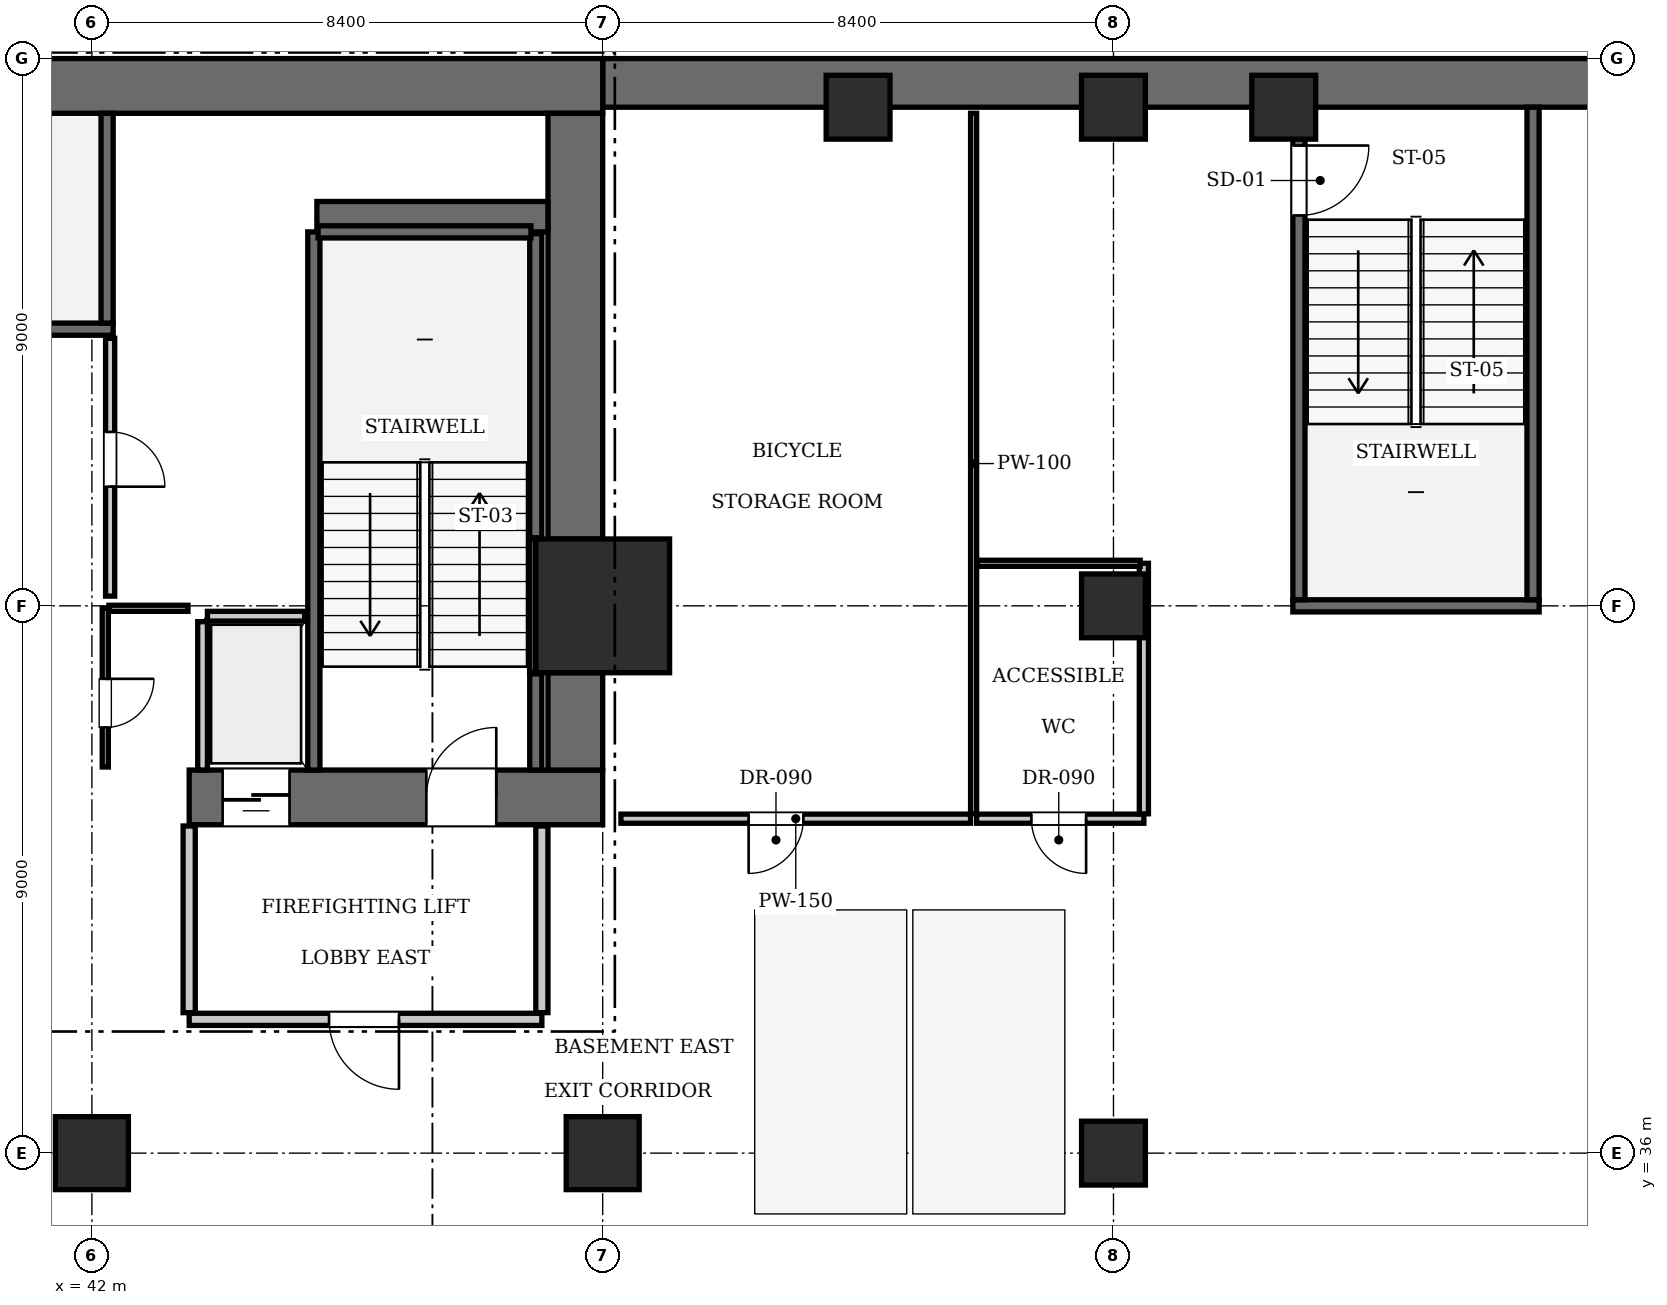
"""IFC4 building model, lengths in metres.
Left out: names, types, materials, properties, quantities, classifications, styles, units other than length and angle.
Written with IfcOpenShell. Run it as: python <this file> out.ifc"""

import sys

from ifc_helpers import new_model, si_unit, direction, frame, frame_2d, origin, origin_2d, place, context, subcontext, project, spatial, rectangle, extrude, element, fill, save


model = new_model("IFC4")
c1 = context("Model", 3, precision=1e-05, world=origin(), true_north=direction((0.0, 1.0)))
c2 = subcontext(c1, "Body", "Model", "MODEL_VIEW")
j1 = project(units=[si_unit("LENGTHUNIT", "METRE"), si_unit("PLANEANGLEUNIT", "RADIAN")], contexts=[c1])
p1 = place(None, origin())
s1 = spatial("IfcSite", under=j1, at=p1, CompositionType="ELEMENT")
p2 = place(p1, origin())
s2 = spatial("IfcBuilding", under=s1, at=p2, CompositionType="ELEMENT")
p3 = place(p2, frame((0.0, 0.0, -9.8)))
s3 = spatial("IfcBuildingStorey", under=s2, at=p3, CompositionType="ELEMENT", Elevation=-9.8)
p4 = place(p3, frame((50.4, 53.6, 0.0), z_axis=(0.0, 0.0, 1.0), x_axis=(1.0, 0.0, 0.0)))
e1 = element("IfcWall", 1, at=p4, inside=s3, PredefinedType="USERDEFINED", context=c2, shape_type="SweptSolid", body=[
    extrude(rectangle(XDim=25.2, YDim=0.8, at=frame_2d((12.6, 0.0))), origin(), (0.0, 0.0, 1.0), 4.55),
])
p5 = place(p3, frame((50.4, 45.0, -0.4), z_axis=(0.0, 0.0, 1.0), x_axis=(1.0, 0.0, 0.0)))
e2 = element("IfcColumn", 2, at=p5, inside=s3, PredefinedType="COLUMN", context=c2, shape_type="SweptSolid", body=[
    extrude(rectangle(XDim=2.2, YDim=2.2, at=origin_2d()), origin(), (0.0, 0.0, 1.0), 4.95),
])
p6 = place(p3, frame((25.2, 53.55, 0.0), z_axis=(0.0, 0.0, 1.0), x_axis=(1.0, 0.0, 0.0)))
e3 = element("IfcWall", 3, at=p6, inside=s3, PredefinedType="SHEAR", context=c2, shape_type="SweptSolid", body=[
    extrude(rectangle(XDim=25.2, YDim=0.9, at=frame_2d((12.6, 0.0))), origin(), (0.0, 0.0, 1.0), 4.55),
])
p7 = place(p3, frame((43.6, 41.85, 0.0), z_axis=(0.0, 0.0, 1.0), x_axis=(1.0, 0.0, 0.0)))
e4 = element("IfcWall", 4, at=p7, inside=s3, PredefinedType="SHEAR", context=c2, shape_type="SweptSolid", body=[
    extrude(rectangle(XDim=6.8, YDim=0.9, at=frame_2d((3.4, 0.0))), origin(), (0.0, 0.0, 1.0), 4.55),
])
p8 = place(p7, frame((3.9, 0.0, 0.0)))
e5 = element("IfcOpeningElement", 5, at=p8, cuts=e4, PredefinedType="OPENING", context=c2, shape_type="SweptSolid", body=[
    extrude(rectangle(XDim=1.15, YDim=2.15, at=frame_2d((0.575, 1.075))), frame((0.0, 0.46, 0.0), z_axis=(0.0, -1.0, 0.0), x_axis=(1.0, 0.0, 0.0)), (0.0, 0.0, 1.0), 0.92),
])
p9 = place(p7, frame((0.55, 0.0, 0.0)))
e6 = element("IfcOpeningElement", 6, at=p9, cuts=e4, PredefinedType="OPENING", context=c2, shape_type="SweptSolid", body=[
    extrude(rectangle(XDim=1.1, YDim=2.2, at=frame_2d((0.55, 1.1))), frame((0.0, 0.46, 0.0), z_axis=(0.0, -1.0, 0.0), x_axis=(1.0, 0.0, 0.0)), (0.0, 0.0, 1.0), 0.92),
])
p10 = place(p3, frame((49.95, 42.3, 0.0), z_axis=(0.0, 0.0, 1.0), x_axis=(0.0, 1.0, 0.0)))
e7 = element("IfcWall", 7, at=p10, inside=s3, PredefinedType="SHEAR", context=c2, shape_type="SweptSolid", body=[
    extrude(rectangle(XDim=1.6, YDim=0.9, at=frame_2d((0.8, 0.0))), origin(), (0.0, 0.0, 1.0), 4.55),
])
p11 = place(p3, frame((49.95, 46.1, 0.0), z_axis=(0.0, 0.0, 1.0), x_axis=(0.0, 1.0, 0.0)))
e8 = element("IfcWall", 8, at=p11, inside=s3, PredefinedType="SHEAR", context=c2, shape_type="SweptSolid", body=[
    extrude(rectangle(XDim=7.0, YDim=0.9, at=frame_2d((3.5, 0.0))), origin(), (0.0, 0.0, 1.0), 4.55),
])
p12 = place(p3, frame((45.7, 51.4, 0.0), z_axis=(0.0, 0.0, 1.0), x_axis=(1.0, 0.0, 0.0)))
e9 = element("IfcWall", 9, at=p12, inside=s3, PredefinedType="SHEAR", context=c2, shape_type="SweptSolid", body=[
    extrude(rectangle(XDim=3.8, YDim=0.5, at=frame_2d((1.9, 0.0))), origin(), (0.0, 0.0, 1.0), 4.55),
])
for number, where, z_axis, x_axis in (
    (10, (42.0, 36.0, -0.4), (0.0, 0.0, 1.0), (1.0, 0.0, 0.0)),
    (11, (50.4, 36.0, -0.4), (0.0, 0.0, 1.0), (1.0, 0.0, 0.0)),
):
    element("IfcColumn", number, at=place(p3, frame(where, z_axis=z_axis, x_axis=x_axis)), inside=s3, PredefinedType="COLUMN", context=c2, shape_type="SweptSolid", body=[
        extrude(rectangle(XDim=1.2, YDim=1.2, at=origin_2d()), origin(), (0.0, 0.0, 1.0), 4.95),
    ])
for number, where, z_axis, x_axis in (
    (12, (58.8, 36.0, -0.4), (0.0, 0.0, 1.0), (1.0, 0.0, 0.0)),
    (13, (58.8, 45.0, -0.4), (0.0, 0.0, 1.0), (1.0, 0.0, 0.0)),
    (14, (58.8, 53.2, -0.4), (0.0, 0.0, 1.0), (1.0, 0.0, 0.0)),
    (15, (54.6, 53.2, -0.4), (0.0, 0.0, 1.0), (1.0, 0.0, 0.0)),
    (16, (61.6, 53.2, -0.4), (0.0, 0.0, 1.0), (1.0, 0.0, 0.0)),
):
    element("IfcColumn", number, at=place(p3, frame(where, z_axis=z_axis, x_axis=x_axis)), inside=s3, PredefinedType="COLUMN", context=c2, shape_type="SweptSolid", body=[
        extrude(rectangle(XDim=1.05, YDim=1.05, at=origin_2d()), origin(), (0.0, 0.0, 1.0), 4.95),
    ])
p13 = place(p3, frame((33.25, 49.55, 0.0), z_axis=(0.0, 0.0, 1.0), x_axis=(1.0, 0.0, 0.0)))
e17 = element("IfcWall", 17, at=p13, inside=s3, PredefinedType="SOLIDWALL", context=c2, shape_type="SweptSolid", body=[
    extrude(rectangle(XDim=9.1, YDim=0.2, at=frame_2d((4.55, 0.0))), origin(), (0.0, 0.0, 1.0), 4.2),
])
p14 = place(p3, frame((42.25, 49.65, 0.0), z_axis=(0.0, 0.0, 1.0), x_axis=(0.0, 1.0, 0.0)))
e18 = element("IfcWall", 18, at=p14, inside=s3, PredefinedType="SOLIDWALL", context=c2, shape_type="SweptSolid", body=[
    extrude(rectangle(XDim=3.45, YDim=0.2, at=frame_2d((1.725, 0.0))), origin(), (0.0, 0.0, 1.0), 4.2),
])
p15 = place(p3, frame((45.65, 42.3, 0.0), z_axis=(0.0, 0.0, 1.0), x_axis=(0.0, 1.0, 0.0)))
e19 = element("IfcWall", 19, at=p15, inside=s3, PredefinedType="SOLIDWALL", context=c2, shape_type="SweptSolid", body=[
    extrude(rectangle(XDim=8.85, YDim=0.2, at=frame_2d((4.425, 0.0))), origin(), (0.0, 0.0, 1.0), 4.2),
])
p16 = place(p3, frame((49.3, 42.3, 0.0), z_axis=(0.0, 0.0, 1.0), x_axis=(0.0, 1.0, 0.0)))
e20 = element("IfcWall", 20, at=p16, inside=s3, PredefinedType="SOLIDWALL", context=c2, shape_type="SweptSolid", body=[
    extrude(rectangle(XDim=1.58, YDim=0.2, at=frame_2d((0.79, 0.0))), origin(), (0.0, 0.0, 1.0), 4.2),
])
p17 = place(p3, frame((49.3, 46.12, 0.0), z_axis=(0.0, 0.0, 1.0), x_axis=(0.0, 1.0, 0.0)))
e21 = element("IfcWall", 21, at=p17, inside=s3, PredefinedType="SOLIDWALL", context=c2, shape_type="SweptSolid", body=[
    extrude(rectangle(XDim=5.0, YDim=0.2, at=frame_2d((2.5, 0.0))), origin(), (0.0, 0.0, 1.0), 4.2),
])
p18 = place(p3, frame((45.72, 51.15, 0.0), z_axis=(0.0, 0.0, 1.0), x_axis=(1.0, 0.0, 0.0)))
e22 = element("IfcWall", 22, at=p18, inside=s3, PredefinedType="SOLIDWALL", context=c2, shape_type="SweptSolid", body=[
    extrude(rectangle(XDim=3.5, YDim=0.2, at=frame_2d((1.75, 0.0))), origin(), (0.0, 0.0, 1.0), 4.2),
])
p19 = place(p3, frame((49.248, 43.9, 0.0), z_axis=(0.0, 0.0, 1.0), x_axis=(0.0, 1.0, 0.0)))
e23 = element("IfcWall", 23, at=p19, inside=s3, PredefinedType="SOLIDWALL", context=c2, shape_type="SweptSolid", body=[
    extrude(rectangle(XDim=2.2, YDim=0.1, at=frame_2d((1.1, 0.0))), origin(), (0.0, 0.0, 1.0), 4.2),
])
p20 = place(p3, frame((61.75, 45.0, 0.0), z_axis=(0.0, 0.0, 1.0), x_axis=(1.0, 0.0, 0.0)))
e24 = element("IfcWall", 24, at=p20, inside=s3, PredefinedType="SOLIDWALL", context=c2, shape_type="SweptSolid", body=[
    extrude(rectangle(XDim=4.05, YDim=0.2, at=frame_2d((2.025, 0.0))), origin(), (0.0, 0.0, 1.0), 3.565),
])
p21 = place(p3, frame((61.85, 45.1, 0.0), z_axis=(0.0, 0.0, 1.0), x_axis=(0.0, 1.0, 0.0)))
e25 = element("IfcWall", 25, at=p21, inside=s3, PredefinedType="SOLIDWALL", context=c2, shape_type="SweptSolid", body=[
    extrude(rectangle(XDim=8.1, YDim=0.2, at=frame_2d((4.05, 0.0))), origin(), (0.0, 0.0, 1.0), 4.2),
])
p22 = place(p21, frame((6.32, 0.0, 0.0)))
e26 = element("IfcOpeningElement", 26, at=p22, cuts=e25, PredefinedType="OPENING", context=c2, shape_type="SweptSolid", body=[
    extrude(rectangle(XDim=1.15, YDim=2.15, at=frame_2d((0.575, 1.075))), frame((0.0, 0.11, 0.0), z_axis=(0.0, -1.0, 0.0), x_axis=(1.0, 0.0, 0.0)), (0.0, 0.0, 1.0), 0.22),
])
p23 = place(p3, frame((65.7, 45.1, 0.0), z_axis=(0.0, 0.0, 1.0), x_axis=(0.0, 1.0, 0.0)))
e27 = element("IfcWall", 27, at=p23, inside=s3, PredefinedType="SOLIDWALL", context=c2, shape_type="SweptSolid", body=[
    extrude(rectangle(XDim=8.1, YDim=0.2, at=frame_2d((4.05, 0.0))), origin(), (0.0, 0.0, 1.0), 4.2),
])
p24 = place(p3, frame((43.9, 44.83, 0.0), z_axis=(0.0, 0.0, 1.0), x_axis=(1.0, 0.0, 0.0)))
e28 = element("IfcWall", 28, at=p24, inside=s3, PredefinedType="SOLIDWALL", context=c2, shape_type="SweptSolid", body=[
    extrude(rectangle(XDim=1.6, YDim=0.16, at=frame_2d((0.8, 0.0))), origin(), (0.0, 0.0, 1.0), 4.2),
])
p25 = place(p3, frame((43.82, 42.3, 0.0), z_axis=(0.0, 0.0, 1.0), x_axis=(0.0, 1.0, 0.0)))
e29 = element("IfcWall", 29, at=p25, inside=s3, PredefinedType="SOLIDWALL", context=c2, shape_type="SweptSolid", body=[
    extrude(rectangle(XDim=2.44, YDim=0.16, at=frame_2d((1.22, 0.0))), origin(), (0.0, 0.0, 1.0), 4.2),
])
p26 = place(p3, frame((43.6, 38.2, 0.0), z_axis=(0.0, 0.0, 1.0), x_axis=(1.0, 0.0, 0.0)))
e30 = element("IfcWall", 30, at=p26, inside=s3, PredefinedType="PARTITIONING", context=c2, shape_type="SweptSolid", body=[
    extrude(rectangle(XDim=5.8, YDim=0.2, at=frame_2d((2.9, 0.0))), origin(), (0.0, 0.0, 1.0), 4.2),
])
p27 = place(p26, frame((2.3, 0.0, 0.0)))
e31 = element("IfcOpeningElement", 31, at=p27, cuts=e30, PredefinedType="OPENING", context=c2, shape_type="SweptSolid", body=[
    extrude(rectangle(XDim=1.15, YDim=2.15, at=frame_2d((0.575, 1.075))), frame((0.0, 0.11, 0.0), z_axis=(0.0, -1.0, 0.0), x_axis=(1.0, 0.0, 0.0)), (0.0, 0.0, 1.0), 0.22),
])
for number, where, z_axis, x_axis in (
    (32, (43.6, 38.31, 0.0), (0.0, 0.0, 1.0), (0.0, 1.0, 0.0)),
    (33, (49.4, 38.31, 0.0), (0.0, 0.0, 1.0), (0.0, 1.0, 0.0)),
):
    element("IfcWall", number, at=place(p3, frame(where, z_axis=z_axis, x_axis=x_axis)), inside=s3, PredefinedType="PARTITIONING", context=c2, shape_type="SweptSolid", body=[
        extrude(rectangle(XDim=3.07, YDim=0.2, at=frame_2d((1.535, 0.0))), origin(), (0.0, 0.0, 1.0), 4.2),
    ])
p28 = place(p3, frame((42.22, 42.35, 0.0), z_axis=(0.0, 0.0, 1.0), x_axis=(0.0, 1.0, 0.0)))
e34 = element("IfcWall", 34, at=p28, inside=s3, PredefinedType="PARTITIONING", context=c2, shape_type="SweptSolid", body=[
    extrude(rectangle(XDim=2.61, YDim=0.1, at=frame_2d((1.305, 0.0))), origin(), (0.0, 0.0, 1.0), 4.2),
])
p29 = place(p28, frame((0.65, 0.0, 0.0)))
e35 = element("IfcOpeningElement", 35, at=p29, cuts=e34, PredefinedType="OPENING", context=c2, shape_type="SweptSolid", body=[
    extrude(rectangle(XDim=0.8, YDim=2.05, at=frame_2d((0.4, 1.025))), frame((0.0, 0.06, 0.0), z_axis=(0.0, -1.0, 0.0), x_axis=(1.0, 0.0, 0.0)), (0.0, 0.0, 1.0), 0.12),
])
p30 = place(p3, frame((42.28, 44.96, 0.0), z_axis=(0.0, 0.0, 1.0), x_axis=(1.0, 0.0, 0.0)))
e36 = element("IfcWall", 36, at=p30, inside=s3, PredefinedType="PARTITIONING", context=c2, shape_type="SweptSolid", body=[
    extrude(rectangle(XDim=1.3, YDim=0.1, at=frame_2d((0.65, 0.0))), origin(), (0.0, 0.0, 1.0), 4.2),
])
p31 = place(p3, frame((42.3, 45.16, 0.0), z_axis=(0.0, 0.0, 1.0), x_axis=(0.0, 1.0, 0.0)))
e37 = element("IfcWall", 37, at=p31, inside=s3, PredefinedType="PARTITIONING", context=c2, shape_type="SweptSolid", body=[
    extrude(rectangle(XDim=4.24, YDim=0.15, at=frame_2d((2.12, 0.0))), origin(), (0.0, 0.0, 1.0), 4.2),
])
p32 = place(p31, frame((1.8, 0.0, 0.0)))
e38 = element("IfcOpeningElement", 38, at=p32, cuts=e37, PredefinedType="OPENING", context=c2, shape_type="SweptSolid", body=[
    extrude(rectangle(XDim=0.9, YDim=2.1, at=frame_2d((0.45, 1.05))), frame((0.0, 0.085, 0.0), z_axis=(0.0, -1.0, 0.0), x_axis=(1.0, 0.0, 0.0)), (0.0, 0.0, 1.0), 0.17),
])
p33 = place(p3, frame((50.7, 41.5, 0.0), z_axis=(0.0, 0.0, 1.0), x_axis=(1.0, 0.0, 0.0)))
e39 = element("IfcWall", 39, at=p33, inside=s3, PredefinedType="PARTITIONING", context=c2, shape_type="SweptSolid", body=[
    extrude(rectangle(XDim=5.75, YDim=0.15, at=frame_2d((2.875, 0.0))), origin(), (0.0, 0.0, 1.0), 4.2),
])
p34 = place(p33, frame((2.1, 0.0, 0.0)))
e40 = element("IfcOpeningElement", 40, at=p34, cuts=e39, PredefinedType="OPENING", context=c2, shape_type="SweptSolid", body=[
    extrude(rectangle(XDim=0.9, YDim=2.1, at=frame_2d((0.45, 1.05))), frame((0.0, 0.085, 0.0), z_axis=(0.0, -1.0, 0.0), x_axis=(1.0, 0.0, 0.0)), (0.0, 0.0, 1.0), 0.17),
])
p35 = place(p3, frame((56.55, 41.5, 0.0), z_axis=(0.0, 0.0, 1.0), x_axis=(1.0, 0.0, 0.0)))
e41 = element("IfcWall", 41, at=p35, inside=s3, PredefinedType="PARTITIONING", context=c2, shape_type="SweptSolid", body=[
    extrude(rectangle(XDim=2.75, YDim=0.15, at=frame_2d((1.375, 0.0))), origin(), (0.0, 0.0, 1.0), 4.2),
])
p36 = place(p35, frame((0.9, 0.0, 0.0)))
e42 = element("IfcOpeningElement", 42, at=p36, cuts=e41, PredefinedType="OPENING", context=c2, shape_type="SweptSolid", body=[
    extrude(rectangle(XDim=0.9, YDim=2.1, at=frame_2d((0.45, 1.05))), frame((0.0, 0.085, 0.0), z_axis=(0.0, -1.0, 0.0), x_axis=(1.0, 0.0, 0.0)), (0.0, 0.0, 1.0), 0.17),
])
p37 = place(p3, frame((56.5, 41.58, 0.0), z_axis=(0.0, 0.0, 1.0), x_axis=(0.0, 1.0, 0.0)))
e43 = element("IfcWall", 43, at=p37, inside=s3, PredefinedType="PARTITIONING", context=c2, shape_type="SweptSolid", body=[
    extrude(rectangle(XDim=11.52, YDim=0.1, at=frame_2d((5.76, 0.0))), origin(), (0.0, 0.0, 1.0), 4.2),
])
p38 = place(p3, frame((59.3, 41.58, 0.0), z_axis=(0.0, 0.0, 1.0), x_axis=(0.0, 1.0, 0.0)))
e44 = element("IfcWall", 44, at=p38, inside=s3, PredefinedType="PARTITIONING", context=c2, shape_type="SweptSolid", body=[
    extrude(rectangle(XDim=4.12, YDim=0.15, at=frame_2d((2.06, 0.0))), origin(), (0.0, 0.0, 1.0), 4.2),
])
p39 = place(p3, frame((56.56, 45.7, 0.0), z_axis=(0.0, 0.0, 1.0), x_axis=(1.0, 0.0, 0.0)))
e45 = element("IfcWall", 45, at=p39, inside=s3, PredefinedType="PARTITIONING", context=c2, shape_type="SweptSolid", body=[
    extrude(rectangle(XDim=2.68, YDim=0.1, at=frame_2d((1.34, 0.0))), origin(), (0.0, 0.0, 1.0), 4.2),
])
p40 = place(p8, origin())
e46 = element("IfcDoor", 46, at=p40, inside=s3, OperationType="SINGLE_SWING_RIGHT", PredefinedType="DOOR", context=c2, shape_type="SweptSolid", body=[
    extrude(rectangle(XDim=1.15, YDim=2.15, at=frame_2d((0.575, 1.075))), frame((0.0, 0.025, 0.0), z_axis=(0.0, -1.0, 0.0), x_axis=(1.0, 0.0, 0.0)), (0.0, 0.0, 1.0), 0.05),
])
fill(e5, e46)
p41 = place(p22, frame((1.15, 0.0, 0.0), z_axis=(0.0, 0.0, 1.0), x_axis=(-1.0, 0.0, 0.0)))
e47 = element("IfcDoor", 47, at=p41, inside=s3, OperationType="SINGLE_SWING_LEFT", PredefinedType="DOOR", context=c2, shape_type="SweptSolid", body=[
    extrude(rectangle(XDim=1.15, YDim=2.15, at=frame_2d((0.575, 1.075))), frame((0.0, 0.025, 0.0), z_axis=(0.0, -1.0, 0.0), x_axis=(1.0, 0.0, 0.0)), (0.0, 0.0, 1.0), 0.05),
])
fill(e26, e47)
p42 = place(p9, frame((1.1, 0.0, 0.0), z_axis=(0.0, 0.0, 1.0), x_axis=(-1.0, 0.0, 0.0)))
e48 = element("IfcDoor", 48, at=p42, inside=s3, OperationType="SLIDING_TO_LEFT", PredefinedType="DOOR", context=c2, shape_type="SweptSolid", body=[
    extrude(rectangle(XDim=1.1, YDim=2.2, at=frame_2d((0.55, 1.1))), frame((0.0, 0.025, 0.0), z_axis=(0.0, -1.0, 0.0), x_axis=(1.0, 0.0, 0.0)), (0.0, 0.0, 1.0), 0.05),
])
fill(e6, e48)
p43 = place(p27, frame((1.15, 0.0, 0.0), z_axis=(0.0, 0.0, 1.0), x_axis=(-1.0, 0.0, 0.0)))
e49 = element("IfcDoor", 49, at=p43, inside=s3, OperationType="SINGLE_SWING_LEFT", PredefinedType="DOOR", context=c2, shape_type="SweptSolid", body=[
    extrude(rectangle(XDim=1.15, YDim=2.15, at=frame_2d((0.575, 1.075))), frame((0.0, 0.025, 0.0), z_axis=(0.0, -1.0, 0.0), x_axis=(1.0, 0.0, 0.0)), (0.0, 0.0, 1.0), 0.05),
])
fill(e31, e49)
p44 = place(p29, frame((0.8, 0.0, 0.0), z_axis=(0.0, 0.0, 1.0), x_axis=(-1.0, 0.0, 0.0)))
e50 = element("IfcDoor", 50, at=p44, inside=s3, OperationType="SINGLE_SWING_LEFT", PredefinedType="DOOR", context=c2, shape_type="SweptSolid", body=[
    extrude(rectangle(XDim=0.8, YDim=2.05, at=frame_2d((0.4, 1.025))), frame((0.0, 0.025, 0.0), z_axis=(0.0, -1.0, 0.0), x_axis=(1.0, 0.0, 0.0)), (0.0, 0.0, 1.0), 0.05),
])
fill(e35, e50)
p45 = place(p32, frame((0.9, 0.0, 0.0), z_axis=(0.0, 0.0, 1.0), x_axis=(-1.0, 0.0, 0.0)))
e51 = element("IfcDoor", 51, at=p45, inside=s3, OperationType="SINGLE_SWING_RIGHT", PredefinedType="DOOR", context=c2, shape_type="SweptSolid", body=[
    extrude(rectangle(XDim=0.9, YDim=2.1, at=frame_2d((0.45, 1.05))), frame((0.0, 0.025, 0.0), z_axis=(0.0, -1.0, 0.0), x_axis=(1.0, 0.0, 0.0)), (0.0, 0.0, 1.0), 0.05),
])
fill(e38, e51)
p46 = place(p34, frame((0.9, 0.0, 0.0), z_axis=(0.0, 0.0, 1.0), x_axis=(-1.0, 0.0, 0.0)))
e52 = element("IfcDoor", 52, at=p46, inside=s3, OperationType="SINGLE_SWING_RIGHT", PredefinedType="DOOR", context=c2, shape_type="SweptSolid", body=[
    extrude(rectangle(XDim=0.9, YDim=2.1, at=frame_2d((0.45, 1.05))), frame((0.0, 0.025, 0.0), z_axis=(0.0, -1.0, 0.0), x_axis=(1.0, 0.0, 0.0)), (0.0, 0.0, 1.0), 0.05),
])
fill(e40, e52)
p47 = place(p36, frame((0.9, 0.0, 0.0), z_axis=(0.0, 0.0, 1.0), x_axis=(-1.0, 0.0, 0.0)))
e53 = element("IfcDoor", 53, at=p47, inside=s3, OperationType="SINGLE_SWING_LEFT", PredefinedType="DOOR", context=c2, shape_type="SweptSolid", body=[
    extrude(rectangle(XDim=0.9, YDim=2.1, at=frame_2d((0.45, 1.05))), frame((0.0, 0.025, 0.0), z_axis=(0.0, -1.0, 0.0), x_axis=(1.0, 0.0, 0.0)), (0.0, 0.0, 1.0), 0.05),
])
fill(e42, e53)
save(model, sys.argv[1])
